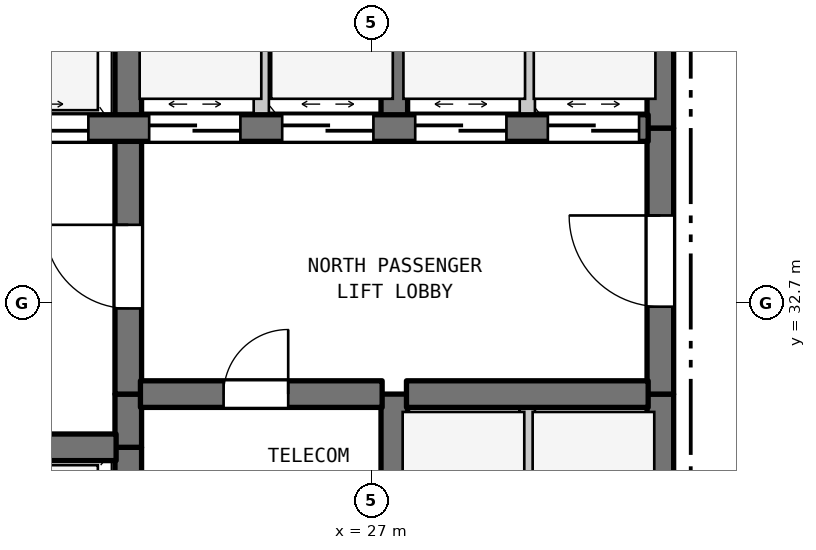
"""IFC4 building model, lengths in metres.
Left out: names, types, materials, properties, quantities, classifications, styles, units other than length and angle.
Written with IfcOpenShell. Run it as: python <this file> out.ifc"""

import sys

from ifc_helpers import new_model, si_unit, direction, frame, frame_2d, origin, place, context, subcontext, project, spatial, rectangle, extrude, element, fill, save


model = new_model("IFC4")
c1 = context("Model", 3, precision=1e-05, world=origin(), true_north=direction((0.0, 1.0)))
c2 = subcontext(c1, "Body", "Model", "MODEL_VIEW")
j1 = project(units=[si_unit("LENGTHUNIT", "METRE"), si_unit("PLANEANGLEUNIT", "RADIAN")], contexts=[c1])
p1 = place(None, origin())
s1 = spatial("IfcSite", under=j1, at=p1, CompositionType="ELEMENT")
p2 = place(p1, origin())
s2 = spatial("IfcBuilding", under=s1, at=p2, CompositionType="ELEMENT")
p3 = place(p2, frame((0.0, 0.0, 57.3)))
s3 = spatial("IfcBuildingStorey", under=s2, at=p3, CompositionType="ELEMENT", Elevation=57.3)
p4 = place(p3, frame((23.8, 29.5, 0.0), z_axis=(0.0, 0.0, 1.0), x_axis=(0.0, 1.0, 0.0)))
e1 = element("IfcWall", 1, at=p4, inside=s3, PredefinedType="SHEAR", context=c2, shape_type="SweptSolid", body=[
    extrude(rectangle(XDim=1.3, YDim=0.35, at=frame_2d((0.65, 0.0))), origin(), (0.0, 0.0, 1.0), 3.28),
])
p5 = place(p3, frame((23.8, 30.8, 0.0), z_axis=(0.0, 0.0, 1.0), x_axis=(0.0, 1.0, 0.0)))
e2 = element("IfcWall", 2, at=p5, inside=s3, PredefinedType="SHEAR", context=c2, shape_type="SweptSolid", body=[
    extrude(rectangle(XDim=0.7, YDim=0.35, at=frame_2d((0.35, 0.0))), origin(), (0.0, 0.0, 1.0), 3.28),
])
p6 = place(p3, frame((23.8, 31.5, 0.0), z_axis=(0.0, 0.0, 1.0), x_axis=(0.0, 1.0, 0.0)))
e3 = element("IfcWall", 3, at=p6, inside=s3, PredefinedType="SHEAR", context=c2, shape_type="SweptSolid", body=[
    extrude(rectangle(XDim=3.5, YDim=0.35, at=frame_2d((1.75, 0.0))), origin(), (0.0, 0.0, 1.0), 3.28),
])
p7 = place(p6, frame((1.127, 0.0, 0.0)))
e4 = element("IfcOpeningElement", 4, at=p7, cuts=e3, PredefinedType="OPENING", context=c2, shape_type="SweptSolid", body=[
    extrude(rectangle(XDim=1.1, YDim=2.15, at=frame_2d((0.55, 1.075))), frame((0.0, 0.185, 0.0), z_axis=(0.0, -1.0, 0.0), x_axis=(1.0, 0.0, 0.0)), (0.0, 0.0, 1.0), 0.37),
])
p8 = place(p3, frame((23.8, 35.0, 0.0), z_axis=(0.0, 0.0, 1.0), x_axis=(0.0, 1.0, 0.0)))
e5 = element("IfcWall", 5, at=p8, inside=s3, PredefinedType="SHEAR", context=c2, shape_type="SweptSolid", body=[
    extrude(rectangle(XDim=2.9, YDim=0.35, at=frame_2d((1.45, 0.0))), origin(), (0.0, 0.0, 1.0), 3.28),
])
p9 = place(p3, frame((25.55, 35.0, 0.0), z_axis=(0.0, 0.0, 1.0), x_axis=(0.0, 1.0, 0.0)))
e6 = element("IfcWall", 6, at=p9, inside=s3, PredefinedType="STANDARD", context=c2, shape_type="SweptSolid", body=[
    extrude(rectangle(XDim=2.9, YDim=0.2, at=frame_2d((1.45, 0.0))), origin(), (0.0, 0.0, 1.0), 3.28),
])
p10 = place(p3, frame((27.3, 29.5, 0.0), z_axis=(0.0, 0.0, 1.0), x_axis=(0.0, 1.0, 0.0)))
e7 = element("IfcWall", 7, at=p10, inside=s3, PredefinedType="SHEAR", context=c2, shape_type="SweptSolid", body=[
    extrude(rectangle(XDim=2.0, YDim=0.35, at=frame_2d((1.0, 0.0))), origin(), (0.0, 0.0, 1.0), 3.28),
])
p11 = place(p3, frame((27.3, 35.0, 0.0), z_axis=(0.0, 0.0, 1.0), x_axis=(0.0, 1.0, 0.0)))
e8 = element("IfcWall", 8, at=p11, inside=s3, PredefinedType="SHEAR", context=c2, shape_type="SweptSolid", body=[
    extrude(rectangle(XDim=2.9, YDim=0.35, at=frame_2d((1.45, 0.0))), origin(), (0.0, 0.0, 1.0), 3.28),
])
p12 = place(p3, frame((29.05, 28.9, 0.0), z_axis=(0.0, 0.0, 1.0), x_axis=(0.0, 1.0, 0.0)))
e9 = element("IfcWall", 9, at=p12, inside=s3, PredefinedType="STANDARD", context=c2, shape_type="SweptSolid", body=[
    extrude(rectangle(XDim=2.6, YDim=0.2, at=frame_2d((1.3, 0.0))), origin(), (0.0, 0.0, 1.0), 3.28),
])
p13 = place(p3, frame((29.05, 35.0, 0.0), z_axis=(0.0, 0.0, 1.0), x_axis=(0.0, 1.0, 0.0)))
e10 = element("IfcWall", 10, at=p13, inside=s3, PredefinedType="STANDARD", context=c2, shape_type="SweptSolid", body=[
    extrude(rectangle(XDim=2.9, YDim=0.2, at=frame_2d((1.45, 0.0))), origin(), (0.0, 0.0, 1.0), 3.28),
])
p14 = place(p3, frame((30.8, 28.9, 0.0), z_axis=(0.0, 0.0, 1.0), x_axis=(0.0, 1.0, 0.0)))
e11 = element("IfcWall", 11, at=p14, inside=s3, PredefinedType="SHEAR", context=c2, shape_type="SweptSolid", body=[
    extrude(rectangle(XDim=2.6, YDim=0.35, at=frame_2d((1.3, 0.0))), origin(), (0.0, 0.0, 1.0), 3.28),
])
p15 = place(p3, frame((30.8, 31.5, 0.0), z_axis=(0.0, 0.0, 1.0), x_axis=(0.0, 1.0, 0.0)))
e12 = element("IfcWall", 12, at=p15, inside=s3, PredefinedType="SHEAR", context=c2, shape_type="SweptSolid", body=[
    extrude(rectangle(XDim=3.5, YDim=0.35, at=frame_2d((1.75, 0.0))), origin(), (0.0, 0.0, 1.0), 3.28),
])
p16 = place(p15, frame((1.15, 0.0, 0.0)))
e13 = element("IfcOpeningElement", 13, at=p16, cuts=e12, PredefinedType="OPENING", context=c2, shape_type="SweptSolid", body=[
    extrude(rectangle(XDim=1.2, YDim=2.2, at=frame_2d((0.6, 1.1))), frame((0.0, 0.185, 0.0), z_axis=(0.0, -1.0, 0.0), x_axis=(1.0, 0.0, 0.0)), (0.0, 0.0, 1.0), 0.37),
])
p17 = place(p3, frame((30.8, 35.0, 0.0), z_axis=(0.0, 0.0, 1.0), x_axis=(0.0, 1.0, 0.0)))
e14 = element("IfcWall", 14, at=p17, inside=s3, PredefinedType="SHEAR", context=c2, shape_type="SweptSolid", body=[
    extrude(rectangle(XDim=2.9, YDim=0.35, at=frame_2d((1.45, 0.0))), origin(), (0.0, 0.0, 1.0), 3.28),
])
p18 = place(p3, frame((19.16, 30.8, 0.0), z_axis=(0.0, 0.0, 1.0), x_axis=(1.0, 0.0, 0.0)))
e15 = element("IfcWall", 15, at=p18, inside=s3, PredefinedType="SHEAR", context=c2, shape_type="SweptSolid", body=[
    extrude(rectangle(XDim=4.48, YDim=0.35, at=frame_2d((2.24, 0.0))), origin(), (0.0, 0.0, 1.0), 3.28),
])
p19 = place(p3, frame((23.96, 31.5, 0.0), z_axis=(0.0, 0.0, 1.0), x_axis=(1.0, 0.0, 0.0)))
e16 = element("IfcWall", 16, at=p19, inside=s3, PredefinedType="SHEAR", context=c2, shape_type="SweptSolid", body=[
    extrude(rectangle(XDim=3.18, YDim=0.35, at=frame_2d((1.59, 0.0))), origin(), (0.0, 0.0, 1.0), 3.28),
])
p20 = place(p19, frame((1.094, 0.0, 0.0)))
e17 = element("IfcOpeningElement", 17, at=p20, cuts=e16, PredefinedType="OPENING", context=c2, shape_type="SweptSolid", body=[
    extrude(rectangle(XDim=0.85, YDim=2.1, at=frame_2d((0.425, 1.05))), frame((0.0, 0.185, 0.0), z_axis=(0.0, -1.0, 0.0), x_axis=(1.0, 0.0, 0.0)), (0.0, 0.0, 1.0), 0.37),
])
p21 = place(p3, frame((27.46, 31.5, 0.0), z_axis=(0.0, 0.0, 1.0), x_axis=(1.0, 0.0, 0.0)))
e18 = element("IfcWall", 18, at=p21, inside=s3, PredefinedType="SHEAR", context=c2, shape_type="SweptSolid", body=[
    extrude(rectangle(XDim=3.18, YDim=0.35, at=frame_2d((1.59, 0.0))), origin(), (0.0, 0.0, 1.0), 3.28),
])
p22 = place(p3, frame((19.16, 35.0, 0.0), z_axis=(0.0, 0.0, 1.0), x_axis=(1.0, 0.0, 0.0)))
e19 = element("IfcWall", 19, at=p22, inside=s3, PredefinedType="SHEAR", context=c2, shape_type="SweptSolid", body=[
    extrude(rectangle(XDim=11.48, YDim=0.35, at=frame_2d((5.74, 0.0))), origin(), (0.0, 0.0, 1.0), 3.28),
])
p23 = place(p22, frame((0.365, 0.0, 0.0)))
e20 = element("IfcOpeningElement", 20, at=p23, cuts=e19, PredefinedType="OPENING", context=c2, shape_type="SweptSolid", body=[
    extrude(rectangle(XDim=1.35, YDim=2.2, at=frame_2d((0.675, 1.1))), frame((0.0, 0.185, 0.0), z_axis=(0.0, -1.0, 0.0), x_axis=(1.0, 0.0, 0.0)), (0.0, 0.0, 1.0), 0.37),
])
p24 = place(p22, frame((2.765, 0.0, 0.0)))
e21 = element("IfcOpeningElement", 21, at=p24, cuts=e19, PredefinedType="OPENING", context=c2, shape_type="SweptSolid", body=[
    extrude(rectangle(XDim=1.35, YDim=2.2, at=frame_2d((0.675, 1.1))), frame((0.0, 0.185, 0.0), z_axis=(0.0, -1.0, 0.0), x_axis=(1.0, 0.0, 0.0)), (0.0, 0.0, 1.0), 0.37),
])
p25 = place(p22, frame((4.915, 0.0, 0.0)))
e22 = element("IfcOpeningElement", 22, at=p25, cuts=e19, PredefinedType="OPENING", context=c2, shape_type="SweptSolid", body=[
    extrude(rectangle(XDim=1.2, YDim=2.2, at=frame_2d((0.6, 1.1))), frame((0.0, 0.185, 0.0), z_axis=(0.0, -1.0, 0.0), x_axis=(1.0, 0.0, 0.0)), (0.0, 0.0, 1.0), 0.37),
])
p26 = place(p22, frame((6.665, 0.0, 0.0)))
e23 = element("IfcOpeningElement", 23, at=p26, cuts=e19, PredefinedType="OPENING", context=c2, shape_type="SweptSolid", body=[
    extrude(rectangle(XDim=1.2, YDim=2.2, at=frame_2d((0.6, 1.1))), frame((0.0, 0.185, 0.0), z_axis=(0.0, -1.0, 0.0), x_axis=(1.0, 0.0, 0.0)), (0.0, 0.0, 1.0), 0.37),
])
p27 = place(p22, frame((8.415, 0.0, 0.0)))
e24 = element("IfcOpeningElement", 24, at=p27, cuts=e19, PredefinedType="OPENING", context=c2, shape_type="SweptSolid", body=[
    extrude(rectangle(XDim=1.2, YDim=2.2, at=frame_2d((0.6, 1.1))), frame((0.0, 0.185, 0.0), z_axis=(0.0, -1.0, 0.0), x_axis=(1.0, 0.0, 0.0)), (0.0, 0.0, 1.0), 0.37),
])
p28 = place(p22, frame((10.16, 0.0, 0.0)))
e25 = element("IfcOpeningElement", 25, at=p28, cuts=e19, PredefinedType="OPENING", context=c2, shape_type="SweptSolid", body=[
    extrude(rectangle(XDim=1.2, YDim=2.2, at=frame_2d((0.6, 1.1))), frame((0.0, 0.185, 0.0), z_axis=(0.0, -1.0, 0.0), x_axis=(1.0, 0.0, 0.0)), (0.0, 0.0, 1.0), 0.37),
])
p29 = place(p7, origin())
e26 = element("IfcDoor", 26, at=p29, inside=s3, OperationType="SINGLE_SWING_RIGHT", PredefinedType="DOOR", context=c2, shape_type="SweptSolid", body=[
    extrude(rectangle(XDim=1.1, YDim=2.15, at=frame_2d((0.55, 1.075))), frame((0.0, 0.025, 0.0), z_axis=(0.0, -1.0, 0.0), x_axis=(1.0, 0.0, 0.0)), (0.0, 0.0, 1.0), 0.05),
])
fill(e4, e26)
p30 = place(p16, origin())
e27 = element("IfcDoor", 27, at=p30, inside=s3, OperationType="SINGLE_SWING_RIGHT", PredefinedType="DOOR", context=c2, shape_type="SweptSolid", body=[
    extrude(rectangle(XDim=1.2, YDim=2.2, at=frame_2d((0.6, 1.1))), frame((0.0, 0.025, 0.0), z_axis=(0.0, -1.0, 0.0), x_axis=(1.0, 0.0, 0.0)), (0.0, 0.0, 1.0), 0.05),
])
fill(e13, e27)
p31 = place(p20, origin())
e28 = element("IfcDoor", 28, at=p31, inside=s3, OperationType="SINGLE_SWING_RIGHT", PredefinedType="DOOR", context=c2, shape_type="SweptSolid", body=[
    extrude(rectangle(XDim=0.85, YDim=2.1, at=frame_2d((0.425, 1.05))), frame((0.0, 0.025, 0.0), z_axis=(0.0, -1.0, 0.0), x_axis=(1.0, 0.0, 0.0)), (0.0, 0.0, 1.0), 0.05),
])
fill(e17, e28)
p32 = place(p24, origin())
e29 = element("IfcDoor", 29, at=p32, inside=s3, OperationType="DOUBLE_DOOR_SLIDING", PredefinedType="DOOR", context=c2, shape_type="SweptSolid", body=[
    extrude(rectangle(XDim=1.35, YDim=2.2, at=frame_2d((0.675, 1.1))), frame((0.0, 0.025, 0.0), z_axis=(0.0, -1.0, 0.0), x_axis=(1.0, 0.0, 0.0)), (0.0, 0.0, 1.0), 0.05),
])
fill(e21, e29)
p33 = place(p25, origin())
e30 = element("IfcDoor", 30, at=p33, inside=s3, OperationType="DOUBLE_DOOR_SLIDING", PredefinedType="DOOR", context=c2, shape_type="SweptSolid", body=[
    extrude(rectangle(XDim=1.2, YDim=2.2, at=frame_2d((0.6, 1.1))), frame((0.0, 0.025, 0.0), z_axis=(0.0, -1.0, 0.0), x_axis=(1.0, 0.0, 0.0)), (0.0, 0.0, 1.0), 0.05),
])
fill(e22, e30)
p34 = place(p26, origin())
e31 = element("IfcDoor", 31, at=p34, inside=s3, OperationType="DOUBLE_DOOR_SLIDING", PredefinedType="DOOR", context=c2, shape_type="SweptSolid", body=[
    extrude(rectangle(XDim=1.2, YDim=2.2, at=frame_2d((0.6, 1.1))), frame((0.0, 0.025, 0.0), z_axis=(0.0, -1.0, 0.0), x_axis=(1.0, 0.0, 0.0)), (0.0, 0.0, 1.0), 0.05),
])
fill(e23, e31)
p35 = place(p27, origin())
e32 = element("IfcDoor", 32, at=p35, inside=s3, OperationType="DOUBLE_DOOR_SLIDING", PredefinedType="DOOR", context=c2, shape_type="SweptSolid", body=[
    extrude(rectangle(XDim=1.2, YDim=2.2, at=frame_2d((0.6, 1.1))), frame((0.0, 0.025, 0.0), z_axis=(0.0, -1.0, 0.0), x_axis=(1.0, 0.0, 0.0)), (0.0, 0.0, 1.0), 0.05),
])
fill(e24, e32)
p36 = place(p28, origin())
e33 = element("IfcDoor", 33, at=p36, inside=s3, OperationType="DOUBLE_DOOR_SLIDING", PredefinedType="DOOR", context=c2, shape_type="SweptSolid", body=[
    extrude(rectangle(XDim=1.2, YDim=2.2, at=frame_2d((0.6, 1.1))), frame((0.0, 0.025, 0.0), z_axis=(0.0, -1.0, 0.0), x_axis=(1.0, 0.0, 0.0)), (0.0, 0.0, 1.0), 0.05),
])
fill(e25, e33)
save(model, sys.argv[1])
